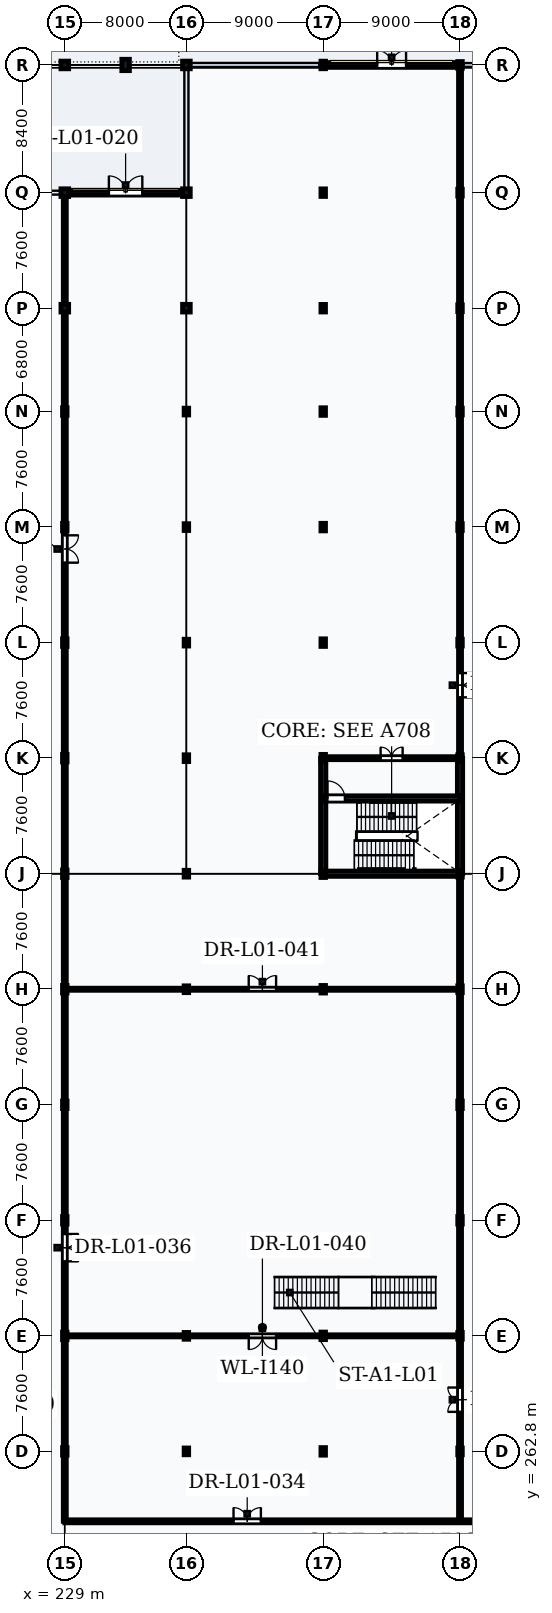
"""IFC4 building model, lengths in metres.
Left out: names, types, materials, properties, quantities, classifications, styles, units other than length and angle.
Written with IfcOpenShell. Run it as: python <this file> out.ifc"""

import sys

from ifc_helpers import new_model, si_unit, direction, frame, frame_2d, origin, origin_2d, place, context, subcontext, project, spatial, rectangle, hollow_circle, i_section, extrude, element, fill, save


model = new_model("IFC4")
c1 = context("Model", 3, precision=1e-05, world=origin(), true_north=direction((0.0, 1.0)))
c2 = subcontext(c1, "Body", "Model", "MODEL_VIEW")
j1 = project(units=[si_unit("LENGTHUNIT", "METRE"), si_unit("PLANEANGLEUNIT", "RADIAN")], contexts=[c1])
p1 = place(None, origin())
s1 = spatial("IfcSite", under=j1, at=p1, CompositionType="ELEMENT")
p2 = place(p1, origin())
s2 = spatial("IfcBuilding", under=s1, at=p2, CompositionType="ELEMENT")
p3 = place(p2, origin())
s3 = spatial("IfcBuildingStorey", under=s2, at=p3, CompositionType="ELEMENT", Elevation=0.0)
for number, where, z_axis, x_axis in (
    (1, (229.0, 262.8, 0.0), (0.0, 0.0, 1.0), (1.0, 0.0, 0.0)),
    (2, (229.0, 270.4, 0.0), (0.0, 0.0, 1.0), (1.0, 0.0, 0.0)),
    (3, (229.0, 278.0, 0.0), (0.0, 0.0, 1.0), (1.0, 0.0, 0.0)),
    (4, (229.0, 285.6, 0.0), (0.0, 0.0, 1.0), (1.0, 0.0, 0.0)),
    (5, (229.0, 293.2, 0.0), (0.0, 0.0, 1.0), (1.0, 0.0, 0.0)),
    (6, (229.0, 300.8, 0.0), (0.0, 0.0, 1.0), (1.0, 0.0, 0.0)),
    (7, (229.0, 308.4, 0.0), (0.0, 0.0, 1.0), (1.0, 0.0, 0.0)),
    (8, (229.0, 316.0, 0.0), (0.0, 0.0, 1.0), (1.0, 0.0, 0.0)),
    (9, (229.0, 323.6, 0.0), (0.0, 0.0, 1.0), (1.0, 0.0, 0.0)),
    (10, (229.0, 331.2, 0.0), (0.0, 0.0, 1.0), (1.0, 0.0, 0.0)),
):
    element("IfcColumn", number, at=place(p3, frame(where, z_axis=z_axis, x_axis=x_axis)), inside=s3, PredefinedType="COLUMN", context=c2, shape_type="SweptSolid", body=[
        extrude(i_section(OverallWidth=0.3, OverallDepth=0.5, WebThickness=0.014, FlangeThickness=0.028, FilletRadius=0.027, at=origin_2d()), origin(), (0.0, 0.0, 1.0), 5.4),
    ])
p4 = place(p3, frame((229.0, 338.0, 0.0), z_axis=(0.0, 0.0, 1.0), x_axis=(1.0, 0.0, 0.0)))
e11 = element("IfcColumn", 11, at=p4, inside=s3, PredefinedType="COLUMN", context=c2, shape_type="SweptSolid", body=[
    extrude(hollow_circle(Radius=0.254, WallThickness=0.016, at=origin_2d()), origin(), (0.0, 0.0, 1.0), 5.4),
])
p5 = place(p3, frame((229.0, 345.6, 0.0), z_axis=(0.0, 0.0, 1.0), x_axis=(1.0, 0.0, 0.0)))
e12 = element("IfcColumn", 12, at=p5, inside=s3, PredefinedType="COLUMN", context=c2, shape_type="SweptSolid", body=[
    extrude(hollow_circle(Radius=0.254, WallThickness=0.016, at=origin_2d()), origin(), (0.0, 0.0, 1.0), 5.35),
])
p6 = place(p3, frame((229.0, 354.0, 0.0), z_axis=(0.0, 0.0, 1.0), x_axis=(1.0, 0.0, 0.0)))
e13 = element("IfcColumn", 13, at=p6, inside=s3, PredefinedType="COLUMN", context=c2, shape_type="SweptSolid", body=[
    extrude(hollow_circle(Radius=0.254, WallThickness=0.016, at=origin_2d()), origin(), (0.0, 0.0, 1.0), 5.4),
])
for number, where, z_axis, x_axis in (
    (14, (237.0, 262.8, 0.0), (0.0, 0.0, 1.0), (1.0, 0.0, 0.0)),
    (15, (237.0, 270.4, 0.0), (0.0, 0.0, 1.0), (1.0, 0.0, 0.0)),
    (16, (237.0, 293.2, 0.0), (0.0, 0.0, 1.0), (1.0, 0.0, 0.0)),
    (17, (237.0, 300.8, 0.0), (0.0, 0.0, 1.0), (1.0, 0.0, 0.0)),
    (18, (237.0, 308.4, 0.0), (0.0, 0.0, 1.0), (1.0, 0.0, 0.0)),
    (19, (237.0, 316.0, 0.0), (0.0, 0.0, 1.0), (1.0, 0.0, 0.0)),
    (20, (237.0, 323.6, 0.0), (0.0, 0.0, 1.0), (1.0, 0.0, 0.0)),
    (21, (237.0, 331.2, 0.0), (0.0, 0.0, 1.0), (1.0, 0.0, 0.0)),
):
    element("IfcColumn", number, at=place(p3, frame(where, z_axis=z_axis, x_axis=x_axis)), inside=s3, PredefinedType="COLUMN", context=c2, shape_type="SweptSolid", body=[
        extrude(i_section(OverallWidth=0.3, OverallDepth=0.45, WebThickness=0.014, FlangeThickness=0.026, FilletRadius=0.027, at=origin_2d()), origin(), (0.0, 0.0, 1.0), 5.4),
    ])
p7 = place(p3, frame((237.0, 338.0, 0.0), z_axis=(0.0, 0.0, 1.0), x_axis=(1.0, 0.0, 0.0)))
e22 = element("IfcColumn", 22, at=p7, inside=s3, PredefinedType="COLUMN", context=c2, shape_type="SweptSolid", body=[
    extrude(hollow_circle(Radius=0.254, WallThickness=0.016, at=origin_2d()), origin(), (0.0, 0.0, 1.0), 5.4),
])
p8 = place(p3, frame((237.0, 345.6, 0.0), z_axis=(0.0, 0.0, 1.0), x_axis=(1.0, 0.0, 0.0)))
e23 = element("IfcColumn", 23, at=p8, inside=s3, PredefinedType="COLUMN", context=c2, shape_type="SweptSolid", body=[
    extrude(hollow_circle(Radius=0.254, WallThickness=0.016, at=origin_2d()), origin(), (0.0, 0.0, 1.0), 5.35),
])
p9 = place(p3, frame((237.0, 354.0, 0.0), z_axis=(0.0, 0.0, 1.0), x_axis=(1.0, 0.0, 0.0)))
e24 = element("IfcColumn", 24, at=p9, inside=s3, PredefinedType="COLUMN", context=c2, shape_type="SweptSolid", body=[
    extrude(hollow_circle(Radius=0.254, WallThickness=0.016, at=origin_2d()), origin(), (0.0, 0.0, 1.0), 5.4),
])
for number, where, z_axis, x_axis in (
    (25, (246.0, 262.8, 0.0), (0.0, 0.0, 1.0), (1.0, 0.0, 0.0)),
    (26, (246.0, 270.4, 0.0), (0.0, 0.0, 1.0), (1.0, 0.0, 0.0)),
    (27, (246.0, 293.2, 0.0), (0.0, 0.0, 1.0), (1.0, 0.0, 0.0)),
    (28, (246.0, 300.8, 0.0), (0.0, 0.0, 1.0), (1.0, 0.0, 0.0)),
    (29, (246.0, 308.4, 0.0), (0.0, 0.0, 1.0), (1.0, 0.0, 0.0)),
    (30, (246.0, 316.0, 0.0), (0.0, 0.0, 1.0), (1.0, 0.0, 0.0)),
    (31, (246.0, 323.6, 0.0), (0.0, 0.0, 1.0), (1.0, 0.0, 0.0)),
    (32, (246.0, 331.2, 0.0), (0.0, 0.0, 1.0), (1.0, 0.0, 0.0)),
    (33, (246.0, 338.0, 0.0), (0.0, 0.0, 1.0), (1.0, 0.0, 0.0)),
    (34, (246.0, 345.6, 0.0), (0.0, 0.0, 1.0), (1.0, 0.0, 0.0)),
    (35, (246.0, 354.0, 0.0), (0.0, 0.0, 1.0), (1.0, 0.0, 0.0)),
):
    element("IfcColumn", number, at=place(p3, frame(where, z_axis=z_axis, x_axis=x_axis)), inside=s3, PredefinedType="COLUMN", context=c2, shape_type="SweptSolid", body=[
        extrude(i_section(OverallWidth=0.3, OverallDepth=0.5, WebThickness=0.014, FlangeThickness=0.028, FilletRadius=0.027, at=origin_2d()), origin(), (0.0, 0.0, 1.0), 5.4),
    ])
for number, where, z_axis, x_axis in (
    (36, (255.0, 262.8, 0.0), (0.0, 0.0, 1.0), (1.0, 0.0, 0.0)),
    (37, (255.0, 270.4, 0.0), (0.0, 0.0, 1.0), (1.0, 0.0, 0.0)),
):
    element("IfcColumn", number, at=place(p3, frame(where, z_axis=z_axis, x_axis=x_axis)), inside=s3, PredefinedType="COLUMN", context=c2, shape_type="SweptSolid", body=[
        extrude(i_section(OverallWidth=0.3, OverallDepth=0.45, WebThickness=0.014, FlangeThickness=0.026, FilletRadius=0.027, at=origin_2d()), origin(), (0.0, 0.0, 1.0), 5.4),
    ])
for number, where, z_axis, x_axis in (
    (38, (255.0, 278.0, 0.0), (0.0, 0.0, 1.0), (1.0, 0.0, 0.0)),
    (39, (255.0, 285.6, 0.0), (0.0, 0.0, 1.0), (1.0, 0.0, 0.0)),
):
    element("IfcColumn", number, at=place(p3, frame(where, z_axis=z_axis, x_axis=x_axis)), inside=s3, PredefinedType="COLUMN", context=c2, shape_type="SweptSolid", body=[
        extrude(i_section(OverallWidth=0.3, OverallDepth=0.5, WebThickness=0.014, FlangeThickness=0.028, FilletRadius=0.027, at=origin_2d()), origin(), (0.0, 0.0, 1.0), 5.4),
    ])
for number, where, z_axis, x_axis in (
    (40, (255.0, 293.2, 0.0), (0.0, 0.0, 1.0), (1.0, 0.0, 0.0)),
    (41, (255.0, 300.8, 0.0), (0.0, 0.0, 1.0), (1.0, 0.0, 0.0)),
    (42, (255.0, 308.4, 0.0), (0.0, 0.0, 1.0), (1.0, 0.0, 0.0)),
    (43, (255.0, 316.0, 0.0), (0.0, 0.0, 1.0), (1.0, 0.0, 0.0)),
    (44, (255.0, 323.6, 0.0), (0.0, 0.0, 1.0), (1.0, 0.0, 0.0)),
    (45, (255.0, 331.2, 0.0), (0.0, 0.0, 1.0), (1.0, 0.0, 0.0)),
    (46, (255.0, 338.0, 0.0), (0.0, 0.0, 1.0), (1.0, 0.0, 0.0)),
    (47, (255.0, 345.6, 0.0), (0.0, 0.0, 1.0), (1.0, 0.0, 0.0)),
    (48, (255.0, 354.0, 0.0), (0.0, 0.0, 1.0), (1.0, 0.0, 0.0)),
):
    element("IfcColumn", number, at=place(p3, frame(where, z_axis=z_axis, x_axis=x_axis)), inside=s3, PredefinedType="COLUMN", context=c2, shape_type="SweptSolid", body=[
        extrude(i_section(OverallWidth=0.3, OverallDepth=0.45, WebThickness=0.014, FlangeThickness=0.026, FilletRadius=0.027, at=origin_2d()), origin(), (0.0, 0.0, 1.0), 5.4),
    ])
p10 = place(p3, frame((233.0, 354.0, 0.0), z_axis=(0.0, 0.0, 1.0), x_axis=(1.0, 0.0, 0.0)))
e49 = element("IfcColumn", 49, at=p10, inside=s3, PredefinedType="PILASTER", context=c2, shape_type="SweptSolid", body=[
    extrude(rectangle(XDim=0.5, YDim=0.75, at=origin_2d()), origin(), (0.0, 0.0, 1.0), 5.4),
])
p11 = place(p3, frame((229.006, 345.6, 0.0), z_axis=(0.0, 0.0, 1.0), x_axis=(1.0, 0.0, 0.0)))
e50 = element("IfcWall", 50, at=p11, inside=s3, PredefinedType="SOLIDWALL", context=c2, shape_type="SweptSolid", body=[
    extrude(rectangle(XDim=7.988, YDim=0.32, at=frame_2d((3.994, 0.0))), origin(), (0.0, 0.0, 1.0), 4.688),
])
p12 = place(p11, frame((2.894, 0.0, 0.0)))
e51 = element("IfcOpeningElement", 51, at=p12, cuts=e50, PredefinedType="OPENING", context=c2, shape_type="SweptSolid", body=[
    extrude(rectangle(XDim=2.2, YDim=2.8, at=frame_2d((1.1, 1.4))), frame((0.0, 0.175, 0.0), z_axis=(0.0, -1.0, 0.0), x_axis=(1.0, 0.0, 0.0)), (0.0, 0.0, 1.0), 0.35),
])
p13 = place(p3, frame((246.006, 354.0, 0.0), z_axis=(0.0, 0.0, 1.0), x_axis=(1.0, 0.0, 0.0)))
e52 = element("IfcWall", 52, at=p13, inside=s3, PredefinedType="SOLIDWALL", context=c2, shape_type="SweptSolid", body=[
    extrude(rectangle(XDim=8.988, YDim=0.32, at=frame_2d((4.494, 0.0))), origin(), (0.0, 0.0, 1.0), 4.798),
])
p14 = place(p13, frame((3.544, 0.0, 0.0)))
e53 = element("IfcOpeningElement", 53, at=p14, cuts=e52, PredefinedType="OPENING", context=c2, shape_type="SweptSolid", body=[
    extrude(rectangle(XDim=1.9, YDim=2.5, at=frame_2d((0.95, 1.25))), frame((0.0, 0.175, 0.0), z_axis=(0.0, -1.0, 0.0), x_axis=(1.0, 0.0, 0.0)), (0.0, 0.0, 1.0), 0.35),
])
p15 = place(p3, frame((255.1, 353.9, 5.4), z_axis=(0.0, 0.0, 1.0), x_axis=(1.0, 0.0, 0.0)))
e54 = element("IfcWall", 54, at=p15, inside=s3, PredefinedType="PARAPET", context=c2, shape_type="SweptSolid", body=[
    extrude(rectangle(XDim=17.8, YDim=0.18, at=frame_2d((8.9, 0.0))), origin(), (0.0, 0.0, 1.0), 1.2),
])
p16 = place(p3, frame((150.1, 353.9, 5.4), z_axis=(0.0, 0.0, 1.0), x_axis=(1.0, 0.0, 0.0)))
e55 = element("IfcWall", 55, at=p16, inside=s3, PredefinedType="PARAPET", context=c2, shape_type="SweptSolid", body=[
    extrude(rectangle(XDim=104.8, YDim=0.18, at=frame_2d((52.4, 0.0))), origin(), (0.0, 0.0, 1.0), 1.2),
])
p17 = place(p3, frame((246.0, 300.8, 0.0), z_axis=(0.0, 0.0, 1.0), x_axis=(1.0, 0.0, 0.0)))
e56 = element("IfcWall", 56, at=p17, inside=s3, PredefinedType="SHEAR", context=c2, shape_type="SweptSolid", body=[
    extrude(rectangle(XDim=9.0, YDim=0.35, at=frame_2d((4.5, 0.0))), origin(), (0.0, 0.0, 1.0), 5.14),
])
for number, where, z_axis, x_axis in (
    (57, (246.0, 300.8, 0.0), (0.0, 0.0, 1.0), (0.0, 1.0, 0.0)),
    (58, (255.0, 300.8, 0.0), (0.0, 0.0, 1.0), (0.0, 1.0, 0.0)),
):
    element("IfcWall", number, at=place(p3, frame(where, z_axis=z_axis, x_axis=x_axis)), inside=s3, PredefinedType="SHEAR", context=c2, shape_type="SweptSolid", body=[
        extrude(rectangle(XDim=7.6, YDim=0.35, at=frame_2d((3.8, 0.0))), origin(), (0.0, 0.0, 1.0), 5.14),
    ])
p18 = place(p3, frame((246.0, 305.75, 0.0), z_axis=(0.0, 0.0, 1.0), x_axis=(1.0, 0.0, 0.0)))
e59 = element("IfcWall", 59, at=p18, inside=s3, PredefinedType="SHEAR", context=c2, shape_type="SweptSolid", body=[
    extrude(rectangle(XDim=9.0, YDim=0.35, at=frame_2d((4.5, 0.0))), origin(), (0.0, 0.0, 1.0), 5.14),
])
p19 = place(p18, frame((0.275, 0.0, 0.0)))
e60 = element("IfcOpeningElement", 60, at=p19, cuts=e59, PredefinedType="OPENING", context=c2, shape_type="SweptSolid", body=[
    extrude(rectangle(XDim=1.15, YDim=2.15, at=frame_2d((0.575, 1.075))), frame((0.0, 0.19, 0.0), z_axis=(0.0, -1.0, 0.0), x_axis=(1.0, 0.0, 0.0)), (0.0, 0.0, 1.0), 0.38),
])
p20 = place(p3, frame((246.0, 308.4, 0.0), z_axis=(0.0, 0.0, 1.0), x_axis=(1.0, 0.0, 0.0)))
e61 = element("IfcWall", 61, at=p20, inside=s3, PredefinedType="PARTITIONING", context=c2, shape_type="SweptSolid", body=[
    extrude(rectangle(XDim=9.0, YDim=0.2, at=frame_2d((4.5, 0.0))), origin(), (0.0, 0.0, 1.0), 4.588),
])
p21 = place(p20, frame((3.775, 0.0, 0.0)))
e62 = element("IfcOpeningElement", 62, at=p21, cuts=e61, PredefinedType="OPENING", context=c2, shape_type="SweptSolid", body=[
    extrude(rectangle(XDim=1.45, YDim=2.2, at=frame_2d((0.725, 1.1))), frame((0.0, 0.115, 0.0), z_axis=(0.0, -1.0, 0.0), x_axis=(1.0, 0.0, 0.0)), (0.0, 0.0, 1.0), 0.23),
])
p22 = place(p3, frame((229.0, 258.2, 0.0), z_axis=(0.0, 0.0, 1.0), x_axis=(1.0, 0.0, 0.0)))
e63 = element("IfcWall", 63, at=p22, inside=s3, PredefinedType="PARTITIONING", context=c2, shape_type="SweptSolid", body=[
    extrude(rectangle(XDim=44.0, YDim=0.2, at=frame_2d((22.0, 0.0))), origin(), (0.0, 0.0, 1.0), 5.14),
])
p23 = place(p22, frame((11.1, 0.0, 0.0)))
e64 = element("IfcOpeningElement", 64, at=p23, cuts=e63, PredefinedType="OPENING", context=c2, shape_type="SweptSolid", body=[
    extrude(rectangle(XDim=1.8, YDim=2.4, at=frame_2d((0.9, 1.2))), frame((0.0, 0.115, 0.0), z_axis=(0.0, -1.0, 0.0), x_axis=(1.0, 0.0, 0.0)), (0.0, 0.0, 1.0), 0.23),
])
p24 = place(p22, frame((32.66, 0.0, 0.0)))
e65 = element("IfcOpeningElement", 65, at=p24, cuts=e63, PredefinedType="OPENING", context=c2, shape_type="SweptSolid", body=[
    extrude(rectangle(XDim=1.8, YDim=2.4, at=frame_2d((0.9, 1.2))), frame((0.0, 0.115, 0.0), z_axis=(0.0, -1.0, 0.0), x_axis=(1.0, 0.0, 0.0)), (0.0, 0.0, 1.0), 0.23),
])
p25 = place(p3, frame((229.0, 258.2, 0.0), z_axis=(0.0, 0.0, 1.0), x_axis=(0.0, 1.0, 0.0)))
e66 = element("IfcWall", 66, at=p25, inside=s3, PredefinedType="PARTITIONING", context=c2, shape_type="SweptSolid", body=[
    extrude(rectangle(XDim=87.4, YDim=0.2, at=frame_2d((43.7, 0.0))), origin(), (0.0, 0.0, 1.0), 2.118),
])
p26 = place(p25, frame((17.1, 0.0, 0.0)))
e67 = element("IfcOpeningElement", 67, at=p26, cuts=e66, PredefinedType="OPENING", context=c2, shape_type="SweptSolid", body=[
    extrude(rectangle(XDim=1.8, YDim=2.1, at=frame_2d((0.9, 1.05))), frame((0.0, 0.115, 0.0), z_axis=(0.0, -1.0, 0.0), x_axis=(1.0, 0.0, 0.0)), (0.0, 0.0, 1.0), 0.23),
])
p27 = place(p25, frame((63.06, 0.0, 0.0)))
e68 = element("IfcOpeningElement", 68, at=p27, cuts=e66, PredefinedType="OPENING", context=c2, shape_type="SweptSolid", body=[
    extrude(rectangle(XDim=1.8, YDim=2.4, at=frame_2d((0.9, 1.2))), frame((0.0, 0.115, 0.0), z_axis=(0.0, -1.0, 0.0), x_axis=(1.0, 0.0, 0.0)), (0.0, 0.0, 1.0), 0.23),
])
p28 = place(p3, frame((255.0, 258.2, 0.0), z_axis=(0.0, 0.0, 1.0), x_axis=(0.0, 1.0, 0.0)))
e69 = element("IfcWall", 69, at=p28, inside=s3, PredefinedType="PARTITIONING", context=c2, shape_type="SweptSolid", body=[
    extrude(rectangle(XDim=42.6, YDim=0.2, at=frame_2d((21.3, 0.0))), origin(), (0.0, 0.0, 1.0), 2.118),
])
p29 = place(p28, frame((7.2, 0.0, 0.0)))
e70 = element("IfcOpeningElement", 70, at=p29, cuts=e69, PredefinedType="OPENING", context=c2, shape_type="SweptSolid", body=[
    extrude(rectangle(XDim=1.6, YDim=2.25, at=frame_2d((0.8, 1.125))), frame((0.0, 0.115, 0.0), z_axis=(0.0, -1.0, 0.0), x_axis=(1.0, 0.0, 0.0)), (0.0, 0.0, 1.0), 0.23),
])
p30 = place(p3, frame((255.0, 308.4, 0.0), z_axis=(0.0, 0.0, 1.0), x_axis=(0.0, 1.0, 0.0)))
e71 = element("IfcWall", 71, at=p30, inside=s3, PredefinedType="PARTITIONING", context=c2, shape_type="SweptSolid", body=[
    extrude(rectangle(XDim=45.6, YDim=0.2, at=frame_2d((22.8, 0.0))), origin(), (0.0, 0.0, 1.0), 4.688),
])
p31 = place(p30, frame((4.0, 0.0, 0.0)))
e72 = element("IfcOpeningElement", 72, at=p31, cuts=e71, PredefinedType="OPENING", context=c2, shape_type="SweptSolid", body=[
    extrude(rectangle(XDim=1.6, YDim=2.25, at=frame_2d((0.8, 1.125))), frame((0.0, 0.115, 0.0), z_axis=(0.0, -1.0, 0.0), x_axis=(1.0, 0.0, 0.0)), (0.0, 0.0, 1.0), 0.23),
])
p32 = place(p3, frame((229.0, 270.4, 0.0), z_axis=(0.0, 0.0, 1.0), x_axis=(1.0, 0.0, 0.0)))
e73 = element("IfcWall", 73, at=p32, inside=s3, PredefinedType="PARTITIONING", context=c2, shape_type="SweptSolid", body=[
    extrude(rectangle(XDim=26.0, YDim=0.14, at=frame_2d((13.0, 0.0))), origin(), (0.0, 0.0, 1.0), 4.588),
])
p33 = place(p32, frame((12.1, 0.0, 0.0)))
e74 = element("IfcOpeningElement", 74, at=p33, cuts=e73, PredefinedType="OPENING", context=c2, shape_type="SweptSolid", body=[
    extrude(rectangle(XDim=1.8, YDim=2.4, at=frame_2d((0.9, 1.2))), frame((0.0, 0.085, 0.0), z_axis=(0.0, -1.0, 0.0), x_axis=(1.0, 0.0, 0.0)), (0.0, 0.0, 1.0), 0.17),
])
p34 = place(p3, frame((229.0, 293.2, 0.0), z_axis=(0.0, 0.0, 1.0), x_axis=(1.0, 0.0, 0.0)))
e75 = element("IfcWall", 75, at=p34, inside=s3, PredefinedType="PARTITIONING", context=c2, shape_type="SweptSolid", body=[
    extrude(rectangle(XDim=26.0, YDim=0.14, at=frame_2d((13.0, 0.0))), origin(), (0.0, 0.0, 1.0), 4.588),
])
p35 = place(p34, frame((12.1, 0.0, 0.0)))
e76 = element("IfcOpeningElement", 76, at=p35, cuts=e75, PredefinedType="OPENING", context=c2, shape_type="SweptSolid", body=[
    extrude(rectangle(XDim=1.8, YDim=2.4, at=frame_2d((0.9, 1.2))), frame((0.0, 0.085, 0.0), z_axis=(0.0, -1.0, 0.0), x_axis=(1.0, 0.0, 0.0)), (0.0, 0.0, 1.0), 0.17),
])
p36 = place(p12, origin())
e77 = element("IfcDoor", 77, at=p36, inside=s3, OperationType="DOUBLE_DOOR_SINGLE_SWING", PredefinedType="DOOR", context=c2, shape_type="SweptSolid", body=[
    extrude(rectangle(XDim=2.2, YDim=2.8, at=frame_2d((1.1, 1.4))), frame((0.0, 0.025, 0.0), z_axis=(0.0, -1.0, 0.0), x_axis=(1.0, 0.0, 0.0)), (0.0, 0.0, 1.0), 0.05),
])
fill(e51, e77)
p37 = place(p14, origin())
e78 = element("IfcDoor", 78, at=p37, inside=s3, OperationType="DOUBLE_DOOR_SINGLE_SWING", PredefinedType="DOOR", context=c2, shape_type="SweptSolid", body=[
    extrude(rectangle(XDim=1.9, YDim=2.5, at=frame_2d((0.95, 1.25))), frame((0.0, 0.025, 0.0), z_axis=(0.0, -1.0, 0.0), x_axis=(1.0, 0.0, 0.0)), (0.0, 0.0, 1.0), 0.05),
])
fill(e53, e78)
p38 = place(p19, origin())
e79 = element("IfcDoor", 79, at=p38, inside=s3, OperationType="SINGLE_SWING_LEFT", PredefinedType="DOOR", context=c2, shape_type="SweptSolid", body=[
    extrude(rectangle(XDim=1.15, YDim=2.15, at=frame_2d((0.575, 1.075))), frame((0.0, 0.025, 0.0), z_axis=(0.0, -1.0, 0.0), x_axis=(1.0, 0.0, 0.0)), (0.0, 0.0, 1.0), 0.05),
])
fill(e60, e79)
p39 = place(p21, origin())
e80 = element("IfcDoor", 80, at=p39, inside=s3, OperationType="DOUBLE_DOOR_SINGLE_SWING", PredefinedType="DOOR", context=c2, shape_type="SweptSolid", body=[
    extrude(rectangle(XDim=1.45, YDim=2.2, at=frame_2d((0.725, 1.1))), frame((0.0, 0.025, 0.0), z_axis=(0.0, -1.0, 0.0), x_axis=(1.0, 0.0, 0.0)), (0.0, 0.0, 1.0), 0.05),
])
fill(e62, e80)
p40 = place(p23, origin())
e81 = element("IfcDoor", 81, at=p40, inside=s3, OperationType="DOUBLE_DOOR_SINGLE_SWING", PredefinedType="DOOR", context=c2, shape_type="SweptSolid", body=[
    extrude(rectangle(XDim=1.8, YDim=2.4, at=frame_2d((0.9, 1.2))), frame((0.0, 0.025, 0.0), z_axis=(0.0, -1.0, 0.0), x_axis=(1.0, 0.0, 0.0)), (0.0, 0.0, 1.0), 0.05),
])
fill(e64, e81)
p41 = place(p26, frame((1.8, 0.0, 0.0), z_axis=(0.0, 0.0, 1.0), x_axis=(-1.0, 0.0, 0.0)))
e82 = element("IfcDoor", 82, at=p41, inside=s3, OperationType="DOUBLE_DOOR_SINGLE_SWING", PredefinedType="DOOR", context=c2, shape_type="SweptSolid", body=[
    extrude(rectangle(XDim=1.8, YDim=2.1, at=frame_2d((0.9, 1.05))), frame((0.0, 0.025, 0.0), z_axis=(0.0, -1.0, 0.0), x_axis=(1.0, 0.0, 0.0)), (0.0, 0.0, 1.0), 0.05),
])
fill(e67, e82)
p42 = place(p27, frame((1.8, 0.0, 0.0), z_axis=(0.0, 0.0, 1.0), x_axis=(-1.0, 0.0, 0.0)))
e83 = element("IfcDoor", 83, at=p42, inside=s3, OperationType="DOUBLE_DOOR_SINGLE_SWING", PredefinedType="DOOR", context=c2, shape_type="SweptSolid", body=[
    extrude(rectangle(XDim=1.8, YDim=2.4, at=frame_2d((0.9, 1.2))), frame((0.0, 0.025, 0.0), z_axis=(0.0, -1.0, 0.0), x_axis=(1.0, 0.0, 0.0)), (0.0, 0.0, 1.0), 0.05),
])
fill(e68, e83)
p43 = place(p29, origin())
e84 = element("IfcDoor", 84, at=p43, inside=s3, OperationType="DOUBLE_DOOR_SINGLE_SWING", PredefinedType="DOOR", context=c2, shape_type="SweptSolid", body=[
    extrude(rectangle(XDim=1.6, YDim=2.25, at=frame_2d((0.8, 1.125))), frame((0.0, 0.025, 0.0), z_axis=(0.0, -1.0, 0.0), x_axis=(1.0, 0.0, 0.0)), (0.0, 0.0, 1.0), 0.05),
])
fill(e70, e84)
p44 = place(p31, frame((1.6, 0.0, 0.0), z_axis=(0.0, 0.0, 1.0), x_axis=(-1.0, 0.0, 0.0)))
e85 = element("IfcDoor", 85, at=p44, inside=s3, OperationType="DOUBLE_DOOR_SINGLE_SWING", PredefinedType="DOOR", context=c2, shape_type="SweptSolid", body=[
    extrude(rectangle(XDim=1.6, YDim=2.25, at=frame_2d((0.8, 1.125))), frame((0.0, 0.025, 0.0), z_axis=(0.0, -1.0, 0.0), x_axis=(1.0, 0.0, 0.0)), (0.0, 0.0, 1.0), 0.05),
])
fill(e72, e85)
p45 = place(p33, frame((1.8, 0.0, 0.0), z_axis=(0.0, 0.0, 1.0), x_axis=(-1.0, 0.0, 0.0)))
e86 = element("IfcDoor", 86, at=p45, inside=s3, OperationType="DOUBLE_DOOR_SINGLE_SWING", PredefinedType="DOOR", context=c2, shape_type="SweptSolid", body=[
    extrude(rectangle(XDim=1.8, YDim=2.4, at=frame_2d((0.9, 1.2))), frame((0.0, 0.025, 0.0), z_axis=(0.0, -1.0, 0.0), x_axis=(1.0, 0.0, 0.0)), (0.0, 0.0, 1.0), 0.05),
])
fill(e74, e86)
p46 = place(p35, origin())
e87 = element("IfcDoor", 87, at=p46, inside=s3, OperationType="DOUBLE_DOOR_SINGLE_SWING", PredefinedType="DOOR", context=c2, shape_type="SweptSolid", body=[
    extrude(rectangle(XDim=1.8, YDim=2.4, at=frame_2d((0.9, 1.2))), frame((0.0, 0.025, 0.0), z_axis=(0.0, -1.0, 0.0), x_axis=(1.0, 0.0, 0.0)), (0.0, 0.0, 1.0), 0.05),
])
fill(e76, e87)
save(model, sys.argv[1])
